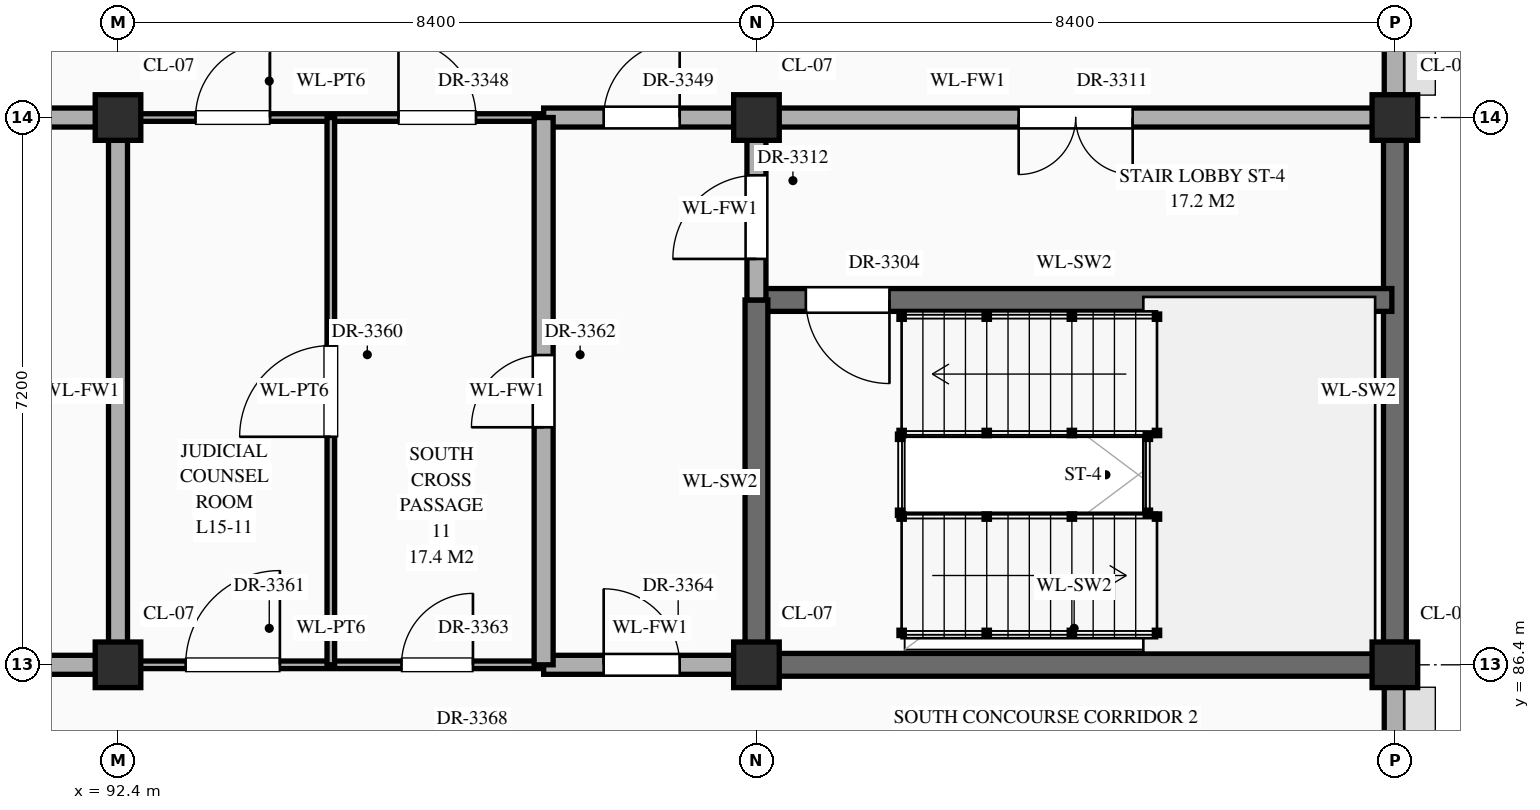
"""IFC4 building model, lengths in metres.
Left out: names, types, materials, properties, quantities, classifications, styles, units other than length and angle.
Written with IfcOpenShell. Run it as: python <this file> out.ifc"""

import sys

from ifc_helpers import new_model, si_unit, direction, frame, frame_2d, origin, origin_2d, place, context, subcontext, project, spatial, rectangle, extrude, element, fill, save


model = new_model("IFC4")
c1 = context("Model", 3, precision=1e-05, world=origin(), true_north=direction((0.0, 1.0)))
c2 = subcontext(c1, "Body", "Model", "MODEL_VIEW")
j1 = project(units=[si_unit("LENGTHUNIT", "METRE"), si_unit("PLANEANGLEUNIT", "RADIAN")], contexts=[c1])
p1 = place(None, origin())
s1 = spatial("IfcSite", under=j1, at=p1, CompositionType="ELEMENT")
p2 = place(p1, origin())
s2 = spatial("IfcBuilding", under=s1, at=p2, CompositionType="ELEMENT")
p3 = place(p2, frame((0.0, 0.0, 64.5)))
s3 = spatial("IfcBuildingStorey", under=s2, at=p3, CompositionType="ELEMENT", Elevation=64.5)
for number, where, z_axis, x_axis in (
    (1, (92.4, 86.4, 0.0), (0.0, 0.0, 1.0), (1.0, 0.0, 0.0)),
    (2, (92.4, 93.6, 0.0), (0.0, 0.0, 1.0), (1.0, 0.0, 0.0)),
    (3, (100.8, 86.4, 0.0), (0.0, 0.0, 1.0), (1.0, 0.0, 0.0)),
    (4, (100.8, 93.6, 0.0), (0.0, 0.0, 1.0), (1.0, 0.0, 0.0)),
    (5, (109.2, 86.4, 0.0), (0.0, 0.0, 1.0), (1.0, 0.0, 0.0)),
    (6, (109.2, 93.6, 0.0), (0.0, 0.0, 1.0), (1.0, 0.0, 0.0)),
):
    element("IfcColumn", number, at=place(p3, frame(where, z_axis=z_axis, x_axis=x_axis)), inside=s3, PredefinedType="COLUMN", context=c2, shape_type="SweptSolid", body=[
        extrude(rectangle(XDim=0.6, YDim=0.6, at=origin_2d()), origin(), (0.0, 0.0, 1.0), 4.2),
    ])
p4 = place(p3, frame((109.2, 79.495, 0.0), z_axis=(0.0, 0.0, 1.0), x_axis=(0.0, 1.0, 0.0)))
e7 = element("IfcWall", 7, at=p4, inside=s3, PredefinedType="STANDARD", context=c2, shape_type="SweptSolid", body=[
    extrude(rectangle(XDim=6.61, YDim=0.28, at=frame_2d((3.305, 0.0))), origin(), (0.0, 0.0, 1.0), 3.2),
])
p5 = place(p4, frame((1.33, 0.0, 0.85)))
e8 = element("IfcOpeningElement", 8, at=p5, cuts=e7, PredefinedType="OPENING", context=c2, shape_type="SweptSolid", body=[
    extrude(rectangle(XDim=1.55, YDim=1.74, at=frame_2d((0.775, 0.87))), frame((0.0, 0.152, 0.0), z_axis=(0.0, -1.0, 0.0), x_axis=(1.0, 0.0, 0.0)), (0.0, 0.0, 1.0), 0.304),
])
p6 = place(p3, frame((109.2, 86.695, 0.0), z_axis=(0.0, 0.0, 1.0), x_axis=(0.0, 1.0, 0.0)))
e9 = element("IfcWall", 9, at=p6, inside=s3, PredefinedType="SHEAR", context=c2, shape_type="SweptSolid", body=[
    extrude(rectangle(XDim=6.61, YDim=0.3, at=frame_2d((3.305, 0.0))), origin(), (0.0, 0.0, 1.0), 3.95),
])
p7 = place(p3, frame((109.2, 93.895, 0.0), z_axis=(0.0, 0.0, 1.0), x_axis=(0.0, 1.0, 0.0)))
e10 = element("IfcWall", 10, at=p7, inside=s3, PredefinedType="STANDARD", context=c2, shape_type="SweptSolid", body=[
    extrude(rectangle(XDim=6.61, YDim=0.28, at=frame_2d((3.305, 0.0))), origin(), (0.0, 0.0, 1.0), 3.3),
])
p8 = place(p7, frame((4.08, 0.0, 0.85)))
e11 = element("IfcOpeningElement", 11, at=p8, cuts=e10, PredefinedType="OPENING", context=c2, shape_type="SweptSolid", body=[
    extrude(rectangle(XDim=1.05, YDim=2.12, at=frame_2d((0.525, 1.06))), frame((0.0, 0.152, 0.0), z_axis=(0.0, -1.0, 0.0), x_axis=(1.0, 0.0, 0.0)), (0.0, 0.0, 1.0), 0.304),
])
p9 = place(p3, frame((84.0, 86.4, 0.0), z_axis=(0.0, 0.0, 1.0), x_axis=(1.0, 0.0, 0.0)))
e12 = element("IfcWall", 12, at=p9, inside=s3, PredefinedType="STANDARD", context=c2, shape_type="SweptSolid", body=[
    extrude(rectangle(XDim=8.4, YDim=0.25, at=frame_2d((4.2, 0.0))), origin(), (0.0, 0.0, 1.0), 3.0),
])
p10 = place(p9, frame((3.725, 0.0, 0.0)))
e13 = element("IfcOpeningElement", 13, at=p10, cuts=e12, PredefinedType="OPENING", context=c2, shape_type="SweptSolid", body=[
    extrude(rectangle(XDim=0.95, YDim=2.15, at=frame_2d((0.475, 1.075))), frame((0.0, 0.137, 0.0), z_axis=(0.0, -1.0, 0.0), x_axis=(1.0, 0.0, 0.0)), (0.0, 0.0, 1.0), 0.274),
])
p11 = place(p3, frame((92.4, 86.4, 0.0), z_axis=(0.0, 0.0, 1.0), x_axis=(1.0, 0.0, 0.0)))
e14 = element("IfcWall", 14, at=p11, inside=s3, PredefinedType="STANDARD", context=c2, shape_type="SweptSolid", body=[
    extrude(rectangle(XDim=5.6, YDim=0.1, at=frame_2d((2.8, 0.0))), origin(), (0.0, 0.0, 1.0), 3.0),
])
p12 = place(p11, frame((0.89, 0.0, 0.0)))
e15 = element("IfcOpeningElement", 15, at=p12, cuts=e14, PredefinedType="OPENING", context=c2, shape_type="SweptSolid", body=[
    extrude(rectangle(XDim=1.24, YDim=2.3, at=frame_2d((0.62, 1.15))), frame((0.0, 0.062, 0.0), z_axis=(0.0, -1.0, 0.0), x_axis=(1.0, 0.0, 0.0)), (0.0, 0.0, 1.0), 0.124),
])
p13 = place(p11, frame((3.73, 0.0, 0.0)))
e16 = element("IfcOpeningElement", 16, at=p13, cuts=e14, PredefinedType="OPENING", context=c2, shape_type="SweptSolid", body=[
    extrude(rectangle(XDim=0.94, YDim=2.3, at=frame_2d((0.47, 1.15))), frame((0.0, 0.062, 0.0), z_axis=(0.0, -1.0, 0.0), x_axis=(1.0, 0.0, 0.0)), (0.0, 0.0, 1.0), 0.124),
])
p14 = place(p3, frame((98.0, 86.4, 0.0), z_axis=(0.0, 0.0, 1.0), x_axis=(1.0, 0.0, 0.0)))
e17 = element("IfcWall", 17, at=p14, inside=s3, PredefinedType="STANDARD", context=c2, shape_type="SweptSolid", body=[
    extrude(rectangle(XDim=2.8, YDim=0.25, at=frame_2d((1.4, 0.0))), origin(), (0.0, 0.0, 1.0), 3.0),
])
p15 = place(p14, frame((0.79, 0.0, 0.0)))
e18 = element("IfcOpeningElement", 18, at=p15, cuts=e17, PredefinedType="OPENING", context=c2, shape_type="SweptSolid", body=[
    extrude(rectangle(XDim=1.0, YDim=2.2, at=frame_2d((0.5, 1.1))), frame((0.0, 0.137, 0.0), z_axis=(0.0, -1.0, 0.0), x_axis=(1.0, 0.0, 0.0)), (0.0, 0.0, 1.0), 0.274),
])
p16 = place(p3, frame((100.8, 86.4, 0.0), z_axis=(0.0, 0.0, 1.0), x_axis=(1.0, 0.0, 0.0)))
e19 = element("IfcWall", 19, at=p16, inside=s3, PredefinedType="SHEAR", context=c2, shape_type="SweptSolid", body=[
    extrude(rectangle(XDim=8.36, YDim=0.3, at=frame_2d((4.18, 0.0))), origin(), (0.0, 0.0, 1.0), 3.85),
])
p17 = place(p3, frame((100.8, 91.2, 0.0), z_axis=(0.0, 0.0, 1.0), x_axis=(1.0, 0.0, 0.0)))
e20 = element("IfcWall", 20, at=p17, inside=s3, PredefinedType="SHEAR", context=c2, shape_type="SweptSolid", body=[
    extrude(rectangle(XDim=8.36, YDim=0.3, at=frame_2d((4.18, 0.0))), origin(), (0.0, 0.0, 1.0), 3.95),
])
p18 = place(p17, frame((0.65, 0.0, 0.0)))
e21 = element("IfcOpeningElement", 21, at=p18, cuts=e20, PredefinedType="OPENING", context=c2, shape_type="SweptSolid", body=[
    extrude(rectangle(XDim=1.1, YDim=2.2, at=frame_2d((0.55, 1.1))), frame((0.0, 0.162, 0.0), z_axis=(0.0, -1.0, 0.0), x_axis=(1.0, 0.0, 0.0)), (0.0, 0.0, 1.0), 0.324),
])
p19 = place(p3, frame((84.0, 93.6, 0.0), z_axis=(0.0, 0.0, 1.0), x_axis=(1.0, 0.0, 0.0)))
e22 = element("IfcWall", 22, at=p19, inside=s3, PredefinedType="STANDARD", context=c2, shape_type="SweptSolid", body=[
    extrude(rectangle(XDim=8.4, YDim=0.25, at=frame_2d((4.2, 0.0))), origin(), (0.0, 0.0, 1.0), 3.1),
])
p20 = place(p19, frame((3.7, 0.0, 0.0)))
e23 = element("IfcOpeningElement", 23, at=p20, cuts=e22, PredefinedType="OPENING", context=c2, shape_type="SweptSolid", body=[
    extrude(rectangle(XDim=1.0, YDim=2.2, at=frame_2d((0.5, 1.1))), frame((0.0, 0.137, 0.0), z_axis=(0.0, -1.0, 0.0), x_axis=(1.0, 0.0, 0.0)), (0.0, 0.0, 1.0), 0.274),
])
p21 = place(p3, frame((92.4, 93.6, 0.0), z_axis=(0.0, 0.0, 1.0), x_axis=(1.0, 0.0, 0.0)))
e24 = element("IfcWall", 24, at=p21, inside=s3, PredefinedType="STANDARD", context=c2, shape_type="SweptSolid", body=[
    extrude(rectangle(XDim=5.6, YDim=0.1, at=frame_2d((2.8, 0.0))), origin(), (0.0, 0.0, 1.0), 3.1),
])
p22 = place(p21, frame((1.02, 0.0, 0.0)))
e25 = element("IfcOpeningElement", 25, at=p22, cuts=e24, PredefinedType="OPENING", context=c2, shape_type="SweptSolid", body=[
    extrude(rectangle(XDim=0.98, YDim=2.35, at=frame_2d((0.49, 1.175))), frame((0.0, 0.062, 0.0), z_axis=(0.0, -1.0, 0.0), x_axis=(1.0, 0.0, 0.0)), (0.0, 0.0, 1.0), 0.124),
])
p23 = place(p21, frame((3.69, 0.0, 0.0)))
e26 = element("IfcOpeningElement", 26, at=p23, cuts=e24, PredefinedType="OPENING", context=c2, shape_type="SweptSolid", body=[
    extrude(rectangle(XDim=1.02, YDim=2.4, at=frame_2d((0.51, 1.2))), frame((0.0, 0.062, 0.0), z_axis=(0.0, -1.0, 0.0), x_axis=(1.0, 0.0, 0.0)), (0.0, 0.0, 1.0), 0.124),
])
p24 = place(p3, frame((98.0, 93.6, 0.0), z_axis=(0.0, 0.0, 1.0), x_axis=(1.0, 0.0, 0.0)))
e27 = element("IfcWall", 27, at=p24, inside=s3, PredefinedType="STANDARD", context=c2, shape_type="SweptSolid", body=[
    extrude(rectangle(XDim=11.16, YDim=0.25, at=frame_2d((5.58, 0.0))), origin(), (0.0, 0.0, 1.0), 3.1),
])
p25 = place(p24, frame((6.25, 0.0, 0.0)))
e28 = element("IfcOpeningElement", 28, at=p25, cuts=e27, PredefinedType="OPENING", context=c2, shape_type="SweptSolid", body=[
    extrude(rectangle(XDim=1.5, YDim=2.25, at=frame_2d((0.75, 1.125))), frame((0.0, 0.137, 0.0), z_axis=(0.0, -1.0, 0.0), x_axis=(1.0, 0.0, 0.0)), (0.0, 0.0, 1.0), 0.274),
])
p26 = place(p24, frame((0.79, 0.0, 0.0)))
e29 = element("IfcOpeningElement", 29, at=p26, cuts=e27, PredefinedType="OPENING", context=c2, shape_type="SweptSolid", body=[
    extrude(rectangle(XDim=1.0, YDim=2.2, at=frame_2d((0.5, 1.1))), frame((0.0, 0.137, 0.0), z_axis=(0.0, -1.0, 0.0), x_axis=(1.0, 0.0, 0.0)), (0.0, 0.0, 1.0), 0.274),
])
p27 = place(p3, frame((92.4, 86.4, 0.0), z_axis=(0.0, 0.0, 1.0), x_axis=(0.0, 1.0, 0.0)))
e30 = element("IfcWall", 30, at=p27, inside=s3, PredefinedType="STANDARD", context=c2, shape_type="SweptSolid", body=[
    extrude(rectangle(XDim=7.2, YDim=0.25, at=frame_2d((3.6, 0.0))), origin(), (0.0, 0.0, 1.0), 3.2),
])
p28 = place(p3, frame((95.2, 86.4, 0.0), z_axis=(0.0, 0.0, 1.0), x_axis=(0.0, 1.0, 0.0)))
e31 = element("IfcWall", 31, at=p28, inside=s3, PredefinedType="STANDARD", context=c2, shape_type="SweptSolid", body=[
    extrude(rectangle(XDim=7.2, YDim=0.1, at=frame_2d((3.6, 0.0))), origin(), (0.0, 0.0, 1.0), 3.95),
])
p29 = place(p28, frame((3.0, 0.0, 0.0)))
e32 = element("IfcOpeningElement", 32, at=p29, cuts=e31, PredefinedType="OPENING", context=c2, shape_type="SweptSolid", body=[
    extrude(rectangle(XDim=1.2, YDim=2.35, at=frame_2d((0.6, 1.175))), frame((0.0, 0.062, 0.0), z_axis=(0.0, -1.0, 0.0), x_axis=(1.0, 0.0, 0.0)), (0.0, 0.0, 1.0), 0.124),
])
p30 = place(p3, frame((98.0, 86.4, 0.0), z_axis=(0.0, 0.0, 1.0), x_axis=(0.0, 1.0, 0.0)))
e33 = element("IfcWall", 33, at=p30, inside=s3, PredefinedType="STANDARD", context=c2, shape_type="SweptSolid", body=[
    extrude(rectangle(XDim=7.2, YDim=0.25, at=frame_2d((3.6, 0.0))), origin(), (0.0, 0.0, 1.0), 3.95),
])
p31 = place(p30, frame((3.125, 0.0, 0.0)))
e34 = element("IfcOpeningElement", 34, at=p31, cuts=e33, PredefinedType="OPENING", context=c2, shape_type="SweptSolid", body=[
    extrude(rectangle(XDim=0.95, YDim=2.15, at=frame_2d((0.475, 1.075))), frame((0.0, 0.137, 0.0), z_axis=(0.0, -1.0, 0.0), x_axis=(1.0, 0.0, 0.0)), (0.0, 0.0, 1.0), 0.274),
])
p32 = place(p3, frame((100.8, 86.4, 0.0), z_axis=(0.0, 0.0, 1.0), x_axis=(0.0, 1.0, 0.0)))
e35 = element("IfcWall", 35, at=p32, inside=s3, PredefinedType="SHEAR", context=c2, shape_type="SweptSolid", body=[
    extrude(rectangle(XDim=4.8, YDim=0.3, at=frame_2d((2.4, 0.0))), origin(), (0.0, 0.0, 1.0), 3.95),
])
p33 = place(p3, frame((100.8, 91.2, 0.0), z_axis=(0.0, 0.0, 1.0), x_axis=(0.0, 1.0, 0.0)))
e36 = element("IfcWall", 36, at=p33, inside=s3, PredefinedType="STANDARD", context=c2, shape_type="SweptSolid", body=[
    extrude(rectangle(XDim=2.4, YDim=0.25, at=frame_2d((1.2, 0.0))), origin(), (0.0, 0.0, 1.0), 3.2),
])
p34 = place(p33, frame((0.54, 0.0, 0.0)))
e37 = element("IfcOpeningElement", 37, at=p34, cuts=e36, PredefinedType="OPENING", context=c2, shape_type="SweptSolid", body=[
    extrude(rectangle(XDim=1.1, YDim=2.2, at=frame_2d((0.55, 1.1))), frame((0.0, 0.137, 0.0), z_axis=(0.0, -1.0, 0.0), x_axis=(1.0, 0.0, 0.0)), (0.0, 0.0, 1.0), 0.274),
])
p35 = place(p18, frame((1.1, 0.0, 0.0), z_axis=(0.0, 0.0, 1.0), x_axis=(-1.0, 0.0, 0.0)))
e38 = element("IfcDoor", 38, at=p35, inside=s3, OperationType="SINGLE_SWING_LEFT", PredefinedType="DOOR", context=c2, shape_type="SweptSolid", body=[
    extrude(rectangle(XDim=1.1, YDim=2.2, at=frame_2d((0.55, 1.1))), frame((0.0, 0.025, 0.0), z_axis=(0.0, -1.0, 0.0), x_axis=(1.0, 0.0, 0.0)), (0.0, 0.0, 1.0), 0.05),
])
fill(e21, e38)
p36 = place(p25, frame((1.5, 0.0, 0.0), z_axis=(0.0, 0.0, 1.0), x_axis=(-1.0, 0.0, 0.0)))
e39 = element("IfcDoor", 39, at=p36, inside=s3, OperationType="DOUBLE_DOOR_SINGLE_SWING", PredefinedType="DOOR", context=c2, shape_type="SweptSolid", body=[
    extrude(rectangle(XDim=1.5, YDim=2.25, at=frame_2d((0.75, 1.125))), frame((0.0, 0.025, 0.0), z_axis=(0.0, -1.0, 0.0), x_axis=(1.0, 0.0, 0.0)), (0.0, 0.0, 1.0), 0.05),
])
fill(e28, e39)
p37 = place(p34, origin())
e40 = element("IfcDoor", 40, at=p37, inside=s3, OperationType="SINGLE_SWING_LEFT", PredefinedType="DOOR", context=c2, shape_type="SweptSolid", body=[
    extrude(rectangle(XDim=1.1, YDim=2.2, at=frame_2d((0.55, 1.1))), frame((0.0, 0.025, 0.0), z_axis=(0.0, -1.0, 0.0), x_axis=(1.0, 0.0, 0.0)), (0.0, 0.0, 1.0), 0.05),
])
fill(e37, e40)
p38 = place(p22, origin())
e41 = element("IfcDoor", 41, at=p38, inside=s3, OperationType="SINGLE_SWING_RIGHT", PredefinedType="DOOR", context=c2, shape_type="SweptSolid", body=[
    extrude(rectangle(XDim=0.98, YDim=2.35, at=frame_2d((0.49, 1.175))), frame((0.0, 0.025, 0.0), z_axis=(0.0, -1.0, 0.0), x_axis=(1.0, 0.0, 0.0)), (0.0, 0.0, 1.0), 0.05),
])
fill(e25, e41)
p39 = place(p23, origin())
e42 = element("IfcDoor", 42, at=p39, inside=s3, OperationType="SINGLE_SWING_LEFT", PredefinedType="DOOR", context=c2, shape_type="SweptSolid", body=[
    extrude(rectangle(XDim=1.02, YDim=2.4, at=frame_2d((0.51, 1.2))), frame((0.0, 0.025, 0.0), z_axis=(0.0, -1.0, 0.0), x_axis=(1.0, 0.0, 0.0)), (0.0, 0.0, 1.0), 0.05),
])
fill(e26, e42)
p40 = place(p26, origin())
e43 = element("IfcDoor", 43, at=p40, inside=s3, OperationType="SINGLE_SWING_RIGHT", PredefinedType="DOOR", context=c2, shape_type="SweptSolid", body=[
    extrude(rectangle(XDim=1.0, YDim=2.2, at=frame_2d((0.5, 1.1))), frame((0.0, 0.025, 0.0), z_axis=(0.0, -1.0, 0.0), x_axis=(1.0, 0.0, 0.0)), (0.0, 0.0, 1.0), 0.05),
])
fill(e29, e43)
p41 = place(p29, origin())
e44 = element("IfcDoor", 44, at=p41, inside=s3, OperationType="SINGLE_SWING_LEFT", PredefinedType="DOOR", context=c2, shape_type="SweptSolid", body=[
    extrude(rectangle(XDim=1.2, YDim=2.35, at=frame_2d((0.6, 1.175))), frame((0.0, 0.025, 0.0), z_axis=(0.0, -1.0, 0.0), x_axis=(1.0, 0.0, 0.0)), (0.0, 0.0, 1.0), 0.05),
])
fill(e32, e44)
p42 = place(p12, origin())
e45 = element("IfcDoor", 45, at=p42, inside=s3, OperationType="SINGLE_SWING_RIGHT", PredefinedType="DOOR", context=c2, shape_type="SweptSolid", body=[
    extrude(rectangle(XDim=1.24, YDim=2.3, at=frame_2d((0.62, 1.15))), frame((0.0, 0.025, 0.0), z_axis=(0.0, -1.0, 0.0), x_axis=(1.0, 0.0, 0.0)), (0.0, 0.0, 1.0), 0.05),
])
fill(e15, e45)
p43 = place(p31, origin())
e46 = element("IfcDoor", 46, at=p43, inside=s3, OperationType="SINGLE_SWING_LEFT", PredefinedType="DOOR", context=c2, shape_type="SweptSolid", body=[
    extrude(rectangle(XDim=0.95, YDim=2.15, at=frame_2d((0.475, 1.075))), frame((0.0, 0.025, 0.0), z_axis=(0.0, -1.0, 0.0), x_axis=(1.0, 0.0, 0.0)), (0.0, 0.0, 1.0), 0.05),
])
fill(e34, e46)
p44 = place(p13, origin())
e47 = element("IfcDoor", 47, at=p44, inside=s3, OperationType="SINGLE_SWING_RIGHT", PredefinedType="DOOR", context=c2, shape_type="SweptSolid", body=[
    extrude(rectangle(XDim=0.94, YDim=2.3, at=frame_2d((0.47, 1.15))), frame((0.0, 0.025, 0.0), z_axis=(0.0, -1.0, 0.0), x_axis=(1.0, 0.0, 0.0)), (0.0, 0.0, 1.0), 0.05),
])
fill(e16, e47)
p45 = place(p15, origin())
e48 = element("IfcDoor", 48, at=p45, inside=s3, OperationType="SINGLE_SWING_LEFT", PredefinedType="DOOR", context=c2, shape_type="SweptSolid", body=[
    extrude(rectangle(XDim=1.0, YDim=2.2, at=frame_2d((0.5, 1.1))), frame((0.0, 0.025, 0.0), z_axis=(0.0, -1.0, 0.0), x_axis=(1.0, 0.0, 0.0)), (0.0, 0.0, 1.0), 0.05),
])
fill(e18, e48)
save(model, sys.argv[1])
